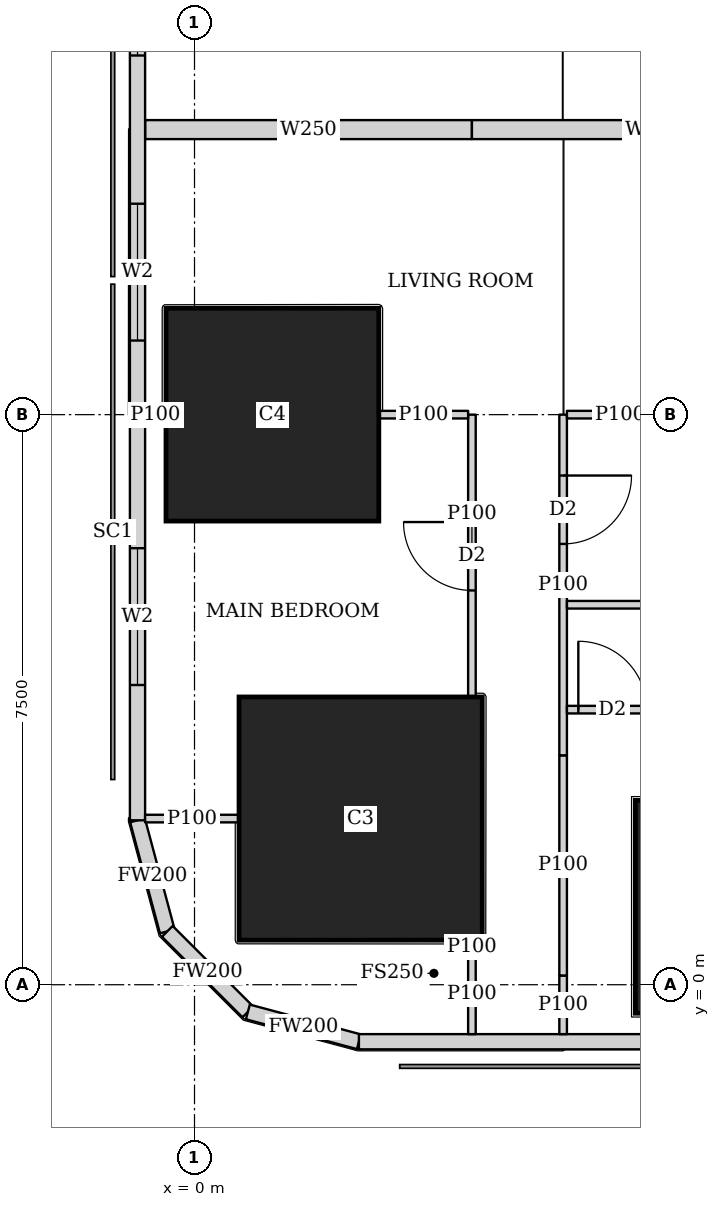
"""IFC4 building model, lengths in metres.
Left out: names, types, materials, properties, quantities, classifications, styles, units other than length and angle.
Written with IfcOpenShell. Run it as: python <this file> out.ifc"""

import sys

from ifc_helpers import new_model, si_unit, direction, frame, frame_2d, origin, origin_2d, place, context, subcontext, project, spatial, rectangle, extrude, element, fill, save


model = new_model("IFC4")
c1 = context("Model", 3, precision=1e-05, world=origin(), true_north=direction((0.0, 1.0)))
c2 = subcontext(c1, "Body", "Model", "MODEL_VIEW")
j1 = project(units=[si_unit("LENGTHUNIT", "METRE"), si_unit("PLANEANGLEUNIT", "RADIAN")], contexts=[c1])
p1 = place(None, origin())
s1 = spatial("IfcSite", under=j1, at=p1, CompositionType="ELEMENT")
p2 = place(p1, origin())
s2 = spatial("IfcBuilding", under=s1, at=p2, CompositionType="ELEMENT")
p3 = place(p2, frame((0.0, 0.0, 68.75)))
s3 = spatial("IfcBuildingStorey", under=s2, at=p3, CompositionType="ELEMENT", Elevation=68.75)
p4 = place(p3, frame((7.2, 1.025, 0.0), z_axis=(0.0, 0.0, 1.0), x_axis=(1.0, 0.0, 0.0)))
e1 = element("IfcColumn", 1, at=p4, inside=s3, PredefinedType="COLUMN", context=c2, shape_type="SweptSolid", body=[
    extrude(rectangle(XDim=2.8, YDim=2.8, at=origin_2d()), origin(), (0.0, 0.0, 1.0), 3.75),
])
p5 = place(p3, frame((2.186, 2.186, 0.0), z_axis=(0.0, 0.0, 1.0), x_axis=(1.0, 0.0, 0.0)))
e2 = element("IfcColumn", 2, at=p5, inside=s3, PredefinedType="COLUMN", context=c2, shape_type="SweptSolid", body=[
    extrude(rectangle(XDim=3.2, YDim=3.2, at=origin_2d()), origin(), (0.0, 0.0, 1.0), 3.75),
])
p6 = place(p3, frame((1.025, 7.5, 0.0), z_axis=(0.0, 0.0, 1.0), x_axis=(1.0, 0.0, 0.0)))
e3 = element("IfcColumn", 3, at=p6, inside=s3, PredefinedType="COLUMN", context=c2, shape_type="SweptSolid", body=[
    extrude(rectangle(XDim=2.8, YDim=2.8, at=origin_2d()), origin(), (0.0, 0.0, 1.0), 3.75),
])
p7 = place(p3, frame((2.163, -0.75, 0.0), z_axis=(0.0, 0.0, 1.0), x_axis=(1.0, 0.0, 0.0)))
e4 = element("IfcWall", 4, at=p7, inside=s3, PredefinedType="SOLIDWALL", context=c2, shape_type="SweptSolid", body=[
    extrude(rectangle(XDim=45.628, YDim=0.2, at=frame_2d((22.814, 0.0))), origin(), (0.0, 0.0, 1.0), 3.45),
])
p8 = place(p7, frame((9.537, 0.0, 0.9)))
e5 = element("IfcOpeningElement", 5, at=p8, cuts=e4, PredefinedType="OPENING", context=c2, shape_type="SweptSolid", body=[
    extrude(rectangle(XDim=1.8, YDim=1.5, at=frame_2d((0.9, 0.75))), frame((0.0, 0.11, 0.0), z_axis=(0.0, -1.0, 0.0), x_axis=(1.0, 0.0, 0.0)), (0.0, 0.0, 1.0), 0.22),
])
p9 = place(p7, frame((13.137, 0.0, 0.9)))
e6 = element("IfcOpeningElement", 6, at=p9, cuts=e4, PredefinedType="OPENING", context=c2, shape_type="SweptSolid", body=[
    extrude(rectangle(XDim=1.8, YDim=1.5, at=frame_2d((0.9, 0.75))), frame((0.0, 0.11, 0.0), z_axis=(0.0, -1.0, 0.0), x_axis=(1.0, 0.0, 0.0)), (0.0, 0.0, 1.0), 0.22),
])
p10 = place(p7, frame((16.737, 0.0, 0.9)))
e7 = element("IfcOpeningElement", 7, at=p10, cuts=e4, PredefinedType="OPENING", context=c2, shape_type="SweptSolid", body=[
    extrude(rectangle(XDim=1.8, YDim=1.5, at=frame_2d((0.9, 0.75))), frame((0.0, 0.11, 0.0), z_axis=(0.0, -1.0, 0.0), x_axis=(1.0, 0.0, 0.0)), (0.0, 0.0, 1.0), 0.22),
])
p11 = place(p7, frame((20.337, 0.0, 0.9)))
e8 = element("IfcOpeningElement", 8, at=p11, cuts=e4, PredefinedType="OPENING", context=c2, shape_type="SweptSolid", body=[
    extrude(rectangle(XDim=1.8, YDim=1.5, at=frame_2d((0.9, 0.75))), frame((0.0, 0.11, 0.0), z_axis=(0.0, -1.0, 0.0), x_axis=(1.0, 0.0, 0.0)), (0.0, 0.0, 1.0), 0.22),
])
p12 = place(p7, frame((23.937, 0.0, 0.9)))
e9 = element("IfcOpeningElement", 9, at=p12, cuts=e4, PredefinedType="OPENING", context=c2, shape_type="SweptSolid", body=[
    extrude(rectangle(XDim=1.8, YDim=1.5, at=frame_2d((0.9, 0.75))), frame((0.0, 0.11, 0.0), z_axis=(0.0, -1.0, 0.0), x_axis=(1.0, 0.0, 0.0)), (0.0, 0.0, 1.0), 0.22),
])
p13 = place(p7, frame((27.537, 0.0, 0.9)))
e10 = element("IfcOpeningElement", 10, at=p13, cuts=e4, PredefinedType="OPENING", context=c2, shape_type="SweptSolid", body=[
    extrude(rectangle(XDim=1.8, YDim=1.5, at=frame_2d((0.9, 0.75))), frame((0.0, 0.11, 0.0), z_axis=(0.0, -1.0, 0.0), x_axis=(1.0, 0.0, 0.0)), (0.0, 0.0, 1.0), 0.22),
])
p14 = place(p7, frame((31.137, 0.0, 0.9)))
e11 = element("IfcOpeningElement", 11, at=p14, cuts=e4, PredefinedType="OPENING", context=c2, shape_type="SweptSolid", body=[
    extrude(rectangle(XDim=1.8, YDim=1.5, at=frame_2d((0.9, 0.75))), frame((0.0, 0.11, 0.0), z_axis=(0.0, -1.0, 0.0), x_axis=(1.0, 0.0, 0.0)), (0.0, 0.0, 1.0), 0.22),
])
p15 = place(p7, frame((34.737, 0.0, 0.9)))
e12 = element("IfcOpeningElement", 12, at=p15, cuts=e4, PredefinedType="OPENING", context=c2, shape_type="SweptSolid", body=[
    extrude(rectangle(XDim=1.8, YDim=1.5, at=frame_2d((0.9, 0.75))), frame((0.0, 0.11, 0.0), z_axis=(0.0, -1.0, 0.0), x_axis=(1.0, 0.0, 0.0)), (0.0, 0.0, 1.0), 0.22),
])
p16 = place(p3, frame((-0.75, 42.837, 0.0), z_axis=(0.0, 0.0, 1.0), x_axis=(0.0, -1.0, 0.0)))
e13 = element("IfcWall", 13, at=p16, inside=s3, PredefinedType="SOLIDWALL", context=c2, shape_type="SweptSolid", body=[
    extrude(rectangle(XDim=40.674, YDim=0.2, at=frame_2d((20.337, 0.0))), origin(), (0.0, 0.0, 1.0), 3.45),
])
p17 = place(p16, frame((1.78, 0.0, 0.9)))
e14 = element("IfcOpeningElement", 14, at=p17, cuts=e13, PredefinedType="OPENING", context=c2, shape_type="SweptSolid", body=[
    extrude(rectangle(XDim=1.8, YDim=1.5, at=frame_2d((0.9, 0.75))), frame((0.0, 0.11, 0.0), z_axis=(0.0, -1.0, 0.0), x_axis=(1.0, 0.0, 0.0)), (0.0, 0.0, 1.0), 0.22),
])
p18 = place(p16, frame((6.312, 0.0, 0.9)))
e15 = element("IfcOpeningElement", 15, at=p18, cuts=e13, PredefinedType="OPENING", context=c2, shape_type="SweptSolid", body=[
    extrude(rectangle(XDim=1.8, YDim=1.5, at=frame_2d((0.9, 0.75))), frame((0.0, 0.11, 0.0), z_axis=(0.0, -1.0, 0.0), x_axis=(1.0, 0.0, 0.0)), (0.0, 0.0, 1.0), 0.22),
])
p19 = place(p16, frame((10.062, 0.0, 0.9)))
e16 = element("IfcOpeningElement", 16, at=p19, cuts=e13, PredefinedType="OPENING", context=c2, shape_type="SweptSolid", body=[
    extrude(rectangle(XDim=1.8, YDim=1.5, at=frame_2d((0.9, 0.75))), frame((0.0, 0.11, 0.0), z_axis=(0.0, -1.0, 0.0), x_axis=(1.0, 0.0, 0.0)), (0.0, 0.0, 1.0), 0.22),
])
p20 = place(p16, frame((13.812, 0.0, 0.9)))
e17 = element("IfcOpeningElement", 17, at=p20, cuts=e13, PredefinedType="OPENING", context=c2, shape_type="SweptSolid", body=[
    extrude(rectangle(XDim=1.8, YDim=1.5, at=frame_2d((0.9, 0.75))), frame((0.0, 0.11, 0.0), z_axis=(0.0, -1.0, 0.0), x_axis=(1.0, 0.0, 0.0)), (0.0, 0.0, 1.0), 0.22),
])
p21 = place(p16, frame((17.562, 0.0, 0.9)))
e18 = element("IfcOpeningElement", 18, at=p21, cuts=e13, PredefinedType="OPENING", context=c2, shape_type="SweptSolid", body=[
    extrude(rectangle(XDim=1.8, YDim=1.5, at=frame_2d((0.9, 0.75))), frame((0.0, 0.11, 0.0), z_axis=(0.0, -1.0, 0.0), x_axis=(1.0, 0.0, 0.0)), (0.0, 0.0, 1.0), 0.22),
])
p22 = place(p16, frame((21.312, 0.0, 0.9)))
e19 = element("IfcOpeningElement", 19, at=p22, cuts=e13, PredefinedType="OPENING", context=c2, shape_type="SweptSolid", body=[
    extrude(rectangle(XDim=1.8, YDim=1.5, at=frame_2d((0.9, 0.75))), frame((0.0, 0.11, 0.0), z_axis=(0.0, -1.0, 0.0), x_axis=(1.0, 0.0, 0.0)), (0.0, 0.0, 1.0), 0.22),
])
p23 = place(p16, frame((25.062, 0.0, 0.9)))
e20 = element("IfcOpeningElement", 20, at=p23, cuts=e13, PredefinedType="OPENING", context=c2, shape_type="SweptSolid", body=[
    extrude(rectangle(XDim=1.8, YDim=1.5, at=frame_2d((0.9, 0.75))), frame((0.0, 0.11, 0.0), z_axis=(0.0, -1.0, 0.0), x_axis=(1.0, 0.0, 0.0)), (0.0, 0.0, 1.0), 0.22),
])
p24 = place(p16, frame((28.812, 0.0, 0.9)))
e21 = element("IfcOpeningElement", 21, at=p24, cuts=e13, PredefinedType="OPENING", context=c2, shape_type="SweptSolid", body=[
    extrude(rectangle(XDim=1.8, YDim=1.5, at=frame_2d((0.9, 0.75))), frame((0.0, 0.11, 0.0), z_axis=(0.0, -1.0, 0.0), x_axis=(1.0, 0.0, 0.0)), (0.0, 0.0, 1.0), 0.22),
])
p25 = place(p16, frame((32.562, 0.0, 0.9)))
e22 = element("IfcOpeningElement", 22, at=p25, cuts=e13, PredefinedType="OPENING", context=c2, shape_type="SweptSolid", body=[
    extrude(rectangle(XDim=1.8, YDim=1.5, at=frame_2d((0.9, 0.75))), frame((0.0, 0.11, 0.0), z_axis=(0.0, -1.0, 0.0), x_axis=(1.0, 0.0, 0.0)), (0.0, 0.0, 1.0), 0.22),
])
p26 = place(p16, frame((37.094, 0.0, 0.9)))
e23 = element("IfcOpeningElement", 23, at=p26, cuts=e13, PredefinedType="OPENING", context=c2, shape_type="SweptSolid", body=[
    extrude(rectangle(XDim=1.8, YDim=1.5, at=frame_2d((0.9, 0.75))), frame((0.0, 0.11, 0.0), z_axis=(0.0, -1.0, 0.0), x_axis=(1.0, 0.0, 0.0)), (0.0, 0.0, 1.0), 0.22),
])
p27 = place(p3, frame((-0.75, 2.163, 0.0), z_axis=(0.0, 0.0, 1.0), x_axis=(0.259168954497, -0.965832000415, 0.0)))
e24 = element("IfcWall", 24, at=p27, inside=s3, PredefinedType="SOLIDWALL", context=c2, shape_type="SweptSolid", body=[
    extrude(rectangle(XDim=1.513, YDim=0.2, at=frame_2d((0.756, 0.0))), origin(), (0.0, 0.0, 1.0), 3.45),
])
p28 = place(p3, frame((-0.358, 0.702, 0.0), z_axis=(0.0, 0.0, 1.0), x_axis=(0.707106781187, -0.707106781187, 0.0)))
e25 = element("IfcWall", 25, at=p28, inside=s3, PredefinedType="SOLIDWALL", context=c2, shape_type="SweptSolid", body=[
    extrude(rectangle(XDim=1.499, YDim=0.2, at=frame_2d((0.75, 0.0))), origin(), (0.0, 0.0, 1.0), 3.45),
])
p29 = place(p3, frame((0.702, -0.358, 0.0), z_axis=(0.0, 0.0, 1.0), x_axis=(0.965832000415, -0.259168954497, 0.0)))
e26 = element("IfcWall", 26, at=p29, inside=s3, PredefinedType="SOLIDWALL", context=c2, shape_type="SweptSolid", body=[
    extrude(rectangle(XDim=1.513, YDim=0.2, at=frame_2d((0.756, 0.0))), origin(), (0.0, 0.0, 1.0), 3.45),
])
p30 = place(p3, frame((3.65, -0.65, 0.0), z_axis=(0.0, 0.0, 1.0), x_axis=(0.0, 1.0, 0.0)))
e27 = element("IfcWall", 27, at=p30, inside=s3, PredefinedType="PARTITIONING", context=c2, shape_type="SweptSolid", body=[
    extrude(rectangle(XDim=1.048, YDim=0.1, at=frame_2d((0.524, 0.0))), origin(), (0.0, 0.0, 1.0), 3.45),
])
p31 = place(p3, frame((3.65, 0.398, 0.0), z_axis=(0.0, 0.0, 1.0), x_axis=(0.0, 1.0, 0.0)))
e28 = element("IfcWall", 28, at=p31, inside=s3, PredefinedType="PARTITIONING", context=c2, shape_type="SweptSolid", body=[
    extrude(rectangle(XDim=0.187, YDim=0.1, at=frame_2d((0.094, 0.0))), origin(), (0.0, 0.0, 1.0), 2.0),
])
p32 = place(p3, frame((3.65, 3.787, 0.0), z_axis=(0.0, 0.0, 1.0), x_axis=(0.0, 1.0, 0.0)))
e29 = element("IfcWall", 29, at=p32, inside=s3, PredefinedType="PARTITIONING", context=c2, shape_type="SweptSolid", body=[
    extrude(rectangle(XDim=3.713, YDim=0.1, at=frame_2d((1.856, 0.0))), origin(), (0.0, 0.0, 1.0), 3.45),
])
p33 = place(p32, frame((1.4, 0.0, 0.0)))
e30 = element("IfcOpeningElement", 30, at=p33, cuts=e29, PredefinedType="OPENING", context=c2, shape_type="SweptSolid", body=[
    extrude(rectangle(XDim=0.9, YDim=2.1, at=frame_2d((0.45, 1.05))), frame((0.0, 0.06, 0.0), z_axis=(0.0, -1.0, 0.0), x_axis=(1.0, 0.0, 0.0)), (0.0, 0.0, 1.0), 0.12),
])
p34 = place(p3, frame((4.85, -0.65, 0.0), z_axis=(0.0, 0.0, 1.0), x_axis=(0.0, 1.0, 0.0)))
e31 = element("IfcWall", 31, at=p34, inside=s3, PredefinedType="PARTITIONING", context=c2, shape_type="SweptSolid", body=[
    extrude(rectangle(XDim=0.771, YDim=0.1, at=frame_2d((0.385, 0.0))), origin(), (0.0, 0.0, 1.0), 3.45),
])
p35 = place(p3, frame((4.85, 0.121, 0.0), z_axis=(0.0, 0.0, 1.0), x_axis=(0.0, 1.0, 0.0)))
e32 = element("IfcWall", 32, at=p35, inside=s3, PredefinedType="PARTITIONING", context=c2, shape_type="SweptSolid", body=[
    extrude(rectangle(XDim=2.897, YDim=0.1, at=frame_2d((1.448, 0.0))), origin(), (0.0, 0.0, 1.0), 2.0),
])
p36 = place(p3, frame((4.85, 3.018, 0.0), z_axis=(0.0, 0.0, 1.0), x_axis=(0.0, 1.0, 0.0)))
e33 = element("IfcWall", 33, at=p36, inside=s3, PredefinedType="PARTITIONING", context=c2, shape_type="SweptSolid", body=[
    extrude(rectangle(XDim=4.482, YDim=0.1, at=frame_2d((2.241, 0.0))), origin(), (0.0, 0.0, 1.0), 3.45),
])
p37 = place(p36, frame((2.781, 0.0, 0.0)))
e34 = element("IfcOpeningElement", 34, at=p37, cuts=e33, PredefinedType="OPENING", context=c2, shape_type="SweptSolid", body=[
    extrude(rectangle(XDim=0.9, YDim=2.1, at=frame_2d((0.45, 1.05))), frame((0.0, 0.06, 0.0), z_axis=(0.0, -1.0, 0.0), x_axis=(1.0, 0.0, 0.0)), (0.0, 0.0, 1.0), 0.12),
])
p38 = place(p3, frame((-0.65, 2.186, 0.0), z_axis=(0.0, 0.0, 1.0), x_axis=(1.0, 0.0, 0.0)))
e35 = element("IfcWall", 35, at=p38, inside=s3, PredefinedType="PARTITIONING", context=c2, shape_type="SweptSolid", body=[
    extrude(rectangle(XDim=1.235, YDim=0.1, at=frame_2d((0.617, 0.0))), origin(), (0.0, 0.0, 1.0), 3.45),
])
p39 = place(p3, frame((-0.65, 7.5, 0.0), z_axis=(0.0, 0.0, 1.0), x_axis=(1.0, 0.0, 0.0)))
e36 = element("IfcWall", 36, at=p39, inside=s3, PredefinedType="PARTITIONING", context=c2, shape_type="SweptSolid", body=[
    extrude(rectangle(XDim=0.274, YDim=0.1, at=frame_2d((0.137, 0.0))), origin(), (0.0, 0.0, 1.0), 3.45),
])
p40 = place(p3, frame((2.426, 7.5, 0.0), z_axis=(0.0, 0.0, 1.0), x_axis=(1.0, 0.0, 0.0)))
e37 = element("IfcWall", 37, at=p40, inside=s3, PredefinedType="PARTITIONING", context=c2, shape_type="SweptSolid", body=[
    extrude(rectangle(XDim=1.174, YDim=0.1, at=frame_2d((0.587, 0.0))), origin(), (0.0, 0.0, 1.0), 2.0),
])
p41 = place(p3, frame((4.9, 4.999, 0.0), z_axis=(0.0, 0.0, 1.0), x_axis=(1.0, 0.0, 0.0)))
e38 = element("IfcWall", 38, at=p41, inside=s3, PredefinedType="PARTITIONING", context=c2, shape_type="SweptSolid", body=[
    extrude(rectangle(XDim=3.525, YDim=0.1, at=frame_2d((1.763, 0.0))), origin(), (0.0, 0.0, 1.0), 3.45),
])
p42 = place(p41, frame((1.325, 0.0, 0.0)))
e39 = element("IfcOpeningElement", 39, at=p42, cuts=e38, PredefinedType="OPENING", context=c2, shape_type="SweptSolid", body=[
    extrude(rectangle(XDim=0.9, YDim=2.1, at=frame_2d((0.45, 1.05))), frame((0.0, 0.06, 0.0), z_axis=(0.0, -1.0, 0.0), x_axis=(1.0, 0.0, 0.0)), (0.0, 0.0, 1.0), 0.12),
])
p43 = place(p3, frame((4.9, 7.5, 0.0), z_axis=(0.0, 0.0, 1.0), x_axis=(1.0, 0.0, 0.0)))
e40 = element("IfcWall", 40, at=p43, inside=s3, PredefinedType="PARTITIONING", context=c2, shape_type="SweptSolid", body=[
    extrude(rectangle(XDim=1.399, YDim=0.1, at=frame_2d((0.7, 0.0))), origin(), (0.0, 0.0, 1.0), 3.45),
])
p44 = place(p3, frame((-0.65, 11.25, 0.0), z_axis=(0.0, 0.0, 1.0), x_axis=(1.0, 0.0, 0.0)))
e41 = element("IfcWall", 41, at=p44, inside=s3, PredefinedType="SOLIDWALL", context=c2, shape_type="SweptSolid", body=[
    extrude(rectangle(XDim=4.3, YDim=0.25, at=frame_2d((2.15, 0.0))), origin(), (0.0, 0.0, 1.0), 2.0),
])
p45 = place(p3, frame((3.65, 11.25, 0.0), z_axis=(0.0, 0.0, 1.0), x_axis=(1.0, 0.0, 0.0)))
e42 = element("IfcWall", 42, at=p45, inside=s3, PredefinedType="SOLIDWALL", context=c2, shape_type="SweptSolid", body=[
    extrude(rectangle(XDim=4.775, YDim=0.25, at=frame_2d((2.388, 0.0))), origin(), (0.0, 0.0, 1.0), 3.45),
])
p46 = place(p3, frame((4.9, 3.619, 0.0), z_axis=(0.0, 0.0, 1.0), x_axis=(1.0, 0.0, 0.0)))
e43 = element("IfcWall", 43, at=p46, inside=s3, PredefinedType="PARTITIONING", context=c2, shape_type="SweptSolid", body=[
    extrude(rectangle(XDim=3.525, YDim=0.1, at=frame_2d((1.763, 0.0))), origin(), (0.0, 0.0, 1.0), 3.45),
])
p47 = place(p46, frame((0.15, 0.0, 0.0)))
e44 = element("IfcOpeningElement", 44, at=p47, cuts=e43, PredefinedType="OPENING", context=c2, shape_type="SweptSolid", body=[
    extrude(rectangle(XDim=0.9, YDim=2.1, at=frame_2d((0.45, 1.05))), frame((0.0, 0.06, 0.0), z_axis=(0.0, -1.0, 0.0), x_axis=(1.0, 0.0, 0.0)), (0.0, 0.0, 1.0), 0.12),
])
p48 = place(p24, origin())
e45 = element("IfcWindow", 45, at=p48, inside=s3, PartitioningType="SINGLE_PANEL", PredefinedType="WINDOW", context=c2, shape_type="SweptSolid", body=[
    extrude(rectangle(XDim=1.8, YDim=1.5, at=frame_2d((0.9, 0.75))), frame((0.0, 0.03, 0.0), z_axis=(0.0, -1.0, 0.0), x_axis=(1.0, 0.0, 0.0)), (0.0, 0.0, 1.0), 0.06),
])
fill(e21, e45)
p49 = place(p25, origin())
e46 = element("IfcWindow", 46, at=p49, inside=s3, PartitioningType="SINGLE_PANEL", PredefinedType="WINDOW", context=c2, shape_type="SweptSolid", body=[
    extrude(rectangle(XDim=1.8, YDim=1.5, at=frame_2d((0.9, 0.75))), frame((0.0, 0.03, 0.0), z_axis=(0.0, -1.0, 0.0), x_axis=(1.0, 0.0, 0.0)), (0.0, 0.0, 1.0), 0.06),
])
fill(e22, e46)
p50 = place(p26, origin())
e47 = element("IfcWindow", 47, at=p50, inside=s3, PartitioningType="SINGLE_PANEL", PredefinedType="WINDOW", context=c2, shape_type="SweptSolid", body=[
    extrude(rectangle(XDim=1.8, YDim=1.5, at=frame_2d((0.9, 0.75))), frame((0.0, 0.03, 0.0), z_axis=(0.0, -1.0, 0.0), x_axis=(1.0, 0.0, 0.0)), (0.0, 0.0, 1.0), 0.06),
])
fill(e23, e47)
p51 = place(p33, origin())
e48 = element("IfcDoor", 48, at=p51, inside=s3, OperationType="SINGLE_SWING_RIGHT", PredefinedType="DOOR", context=c2, shape_type="SweptSolid", body=[
    extrude(rectangle(XDim=0.9, YDim=2.1, at=frame_2d((0.45, 1.05))), frame((0.0, 0.025, 0.0), z_axis=(0.0, -1.0, 0.0), x_axis=(1.0, 0.0, 0.0)), (0.0, 0.0, 1.0), 0.05),
])
fill(e30, e48)
p52 = place(p37, origin())
e49 = element("IfcDoor", 49, at=p52, inside=s3, OperationType="SINGLE_SWING_LEFT", PredefinedType="DOOR", context=c2, shape_type="SweptSolid", body=[
    extrude(rectangle(XDim=0.9, YDim=2.1, at=frame_2d((0.45, 1.05))), frame((0.0, 0.025, 0.0), z_axis=(0.0, -1.0, 0.0), x_axis=(1.0, 0.0, 0.0)), (0.0, 0.0, 1.0), 0.05),
])
fill(e34, e49)
p53 = place(p47, origin())
e50 = element("IfcDoor", 50, at=p53, inside=s3, OperationType="SINGLE_SWING_LEFT", PredefinedType="DOOR", context=c2, shape_type="SweptSolid", body=[
    extrude(rectangle(XDim=0.9, YDim=2.1, at=frame_2d((0.45, 1.05))), frame((0.0, 0.025, 0.0), z_axis=(0.0, -1.0, 0.0), x_axis=(1.0, 0.0, 0.0)), (0.0, 0.0, 1.0), 0.05),
])
fill(e44, e50)
save(model, sys.argv[1])
